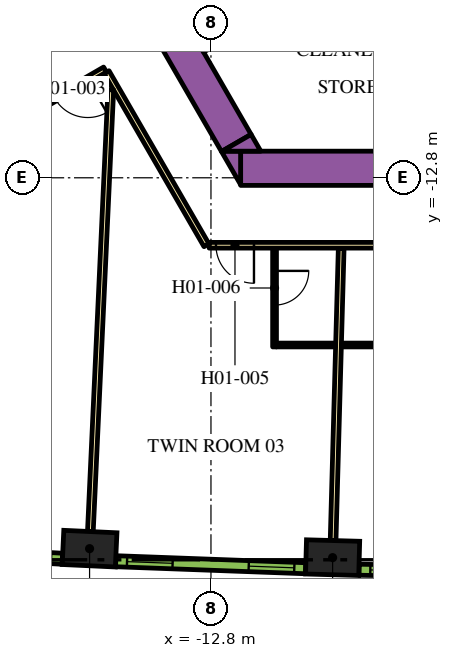
"""IFC4 building model, lengths in metres.
Left out: names, types, materials, properties, quantities, classifications, styles, units other than length and angle.
Written with IfcOpenShell. Run it as: python <this file> out.ifc"""

import sys

from ifc_helpers import new_model, si_unit, direction, frame, frame_2d, origin, origin_2d, place, context, subcontext, project, spatial, polyline, rectangle, outline, extrude, element, fill, save


model = new_model("IFC4")
c1 = context("Model", 3, precision=1e-05, world=origin(), true_north=direction((0.0, 1.0)))
c2 = subcontext(c1, "Body", "Model", "MODEL_VIEW")
j1 = project(units=[si_unit("LENGTHUNIT", "METRE"), si_unit("PLANEANGLEUNIT", "RADIAN")], contexts=[c1])
p1 = place(None, origin())
s1 = spatial("IfcSite", under=j1, at=p1, CompositionType="ELEMENT")
p2 = place(p1, origin())
s2 = spatial("IfcBuilding", under=s1, at=p2, CompositionType="ELEMENT")
p3 = place(p2, frame((0.0, 0.0, 27.6)))
s3 = spatial("IfcBuildingStorey", under=s2, at=p3, CompositionType="ELEMENT", Elevation=27.6)
for number, where, z_axis, x_axis in (
    (1, (-15.994, -22.558, 0.0), (0.0, 0.0, 1.0), (0.999, -0.046, 0.0)),
    (2, (-9.599, -22.795, 0.0), (0.0, 0.0, 1.0), (1.0, -0.028, 0.0)),
):
    element("IfcColumn", number, at=place(p3, frame(where, z_axis=z_axis, x_axis=x_axis)), inside=s3, PredefinedType="COLUMN", context=c2, shape_type="SweptSolid", body=[
        extrude(rectangle(XDim=1.4, YDim=0.9, at=origin_2d()), origin(), (0.0, 0.0, 1.0), 3.9),
    ])
p4 = place(p3, frame((-12.019, -12.55, 0.0), z_axis=(0.0, 0.0, 1.0), x_axis=(1.0, 0.0, 0.0)))
e3 = element("IfcWall", 3, at=p4, inside=s3, PredefinedType="SOLIDWALL", context=c2, shape_type="SweptSolid", body=[
    extrude(rectangle(XDim=21.63, YDim=0.9, at=frame_2d((10.815, 0.0))), origin(), (0.0, 0.0, 1.0), 3.9),
])
p5 = place(p3, origin())
e4 = element("IfcWall", 4, at=p5, inside=s3, PredefinedType="SOLIDWALL", context=c2, shape_type="SweptSolid", body=[
    extrude(outline(polyline([(-12.529, -12.1), (-12.021, -12.1), (-12.021, -12.98), (-12.529, -12.1)])), origin(), (0.0, 0.0, 1.0), 3.9),
])
p6 = place(p3, frame((-12.134, -11.883, 0.0), z_axis=(0.0, 0.0, 1.0), x_axis=(-0.500005339912, 0.866022320763, 0.0)))
e5 = element("IfcWall", 5, at=p6, inside=s3, PredefinedType="SOLIDWALL", context=c2, shape_type="SweptSolid", body=[
    extrude(rectangle(XDim=9.488, YDim=0.9, at=frame_2d((4.744, 0.0))), origin(), (0.0, 0.0, 1.0), 3.9),
])
e6 = element("IfcWall", 6, at=p5, inside=s3, PredefinedType="SOLIDWALL", context=c2, shape_type="SweptSolid", body=[
    extrude(outline(polyline([(-11.489, -12.1), (-12.505, -12.1), (-11.743, -11.66), (-11.489, -12.1)])), origin(), (0.0, 0.0, 1.0), 3.9),
])
p7 = place(p3, frame((-30.463, -16.635, 0.0), z_axis=(0.0, 0.0, 1.0), x_axis=(0.866022394896, 0.500005211512, 0.0)))
e7 = element("IfcWall", 7, at=p7, inside=s3, PredefinedType="PARTITIONING", context=c2, shape_type="SweptSolid", body=[
    extrude(rectangle(XDim=16.144, YDim=0.15, at=frame_2d((8.072, 0.0))), origin(), (0.0, 0.0, 1.0), 2.75),
])
p8 = place(p7, frame((11.004, 0.0, 0.0)))
e8 = element("IfcOpeningElement", 8, at=p8, cuts=e7, PredefinedType="OPENING", context=c2, shape_type="SweptSolid", body=[
    extrude(rectangle(XDim=1.0, YDim=2.1, at=frame_2d((0.5, 1.05))), frame((0.0, 0.085, 0.0), z_axis=(0.0, -1.0, 0.0), x_axis=(1.0, 0.0, 0.0)), (0.0, 0.0, 1.0), 0.17),
])
p9 = place(p7, frame((7.274, 0.0, 0.0)))
e9 = element("IfcOpeningElement", 9, at=p9, cuts=e7, PredefinedType="OPENING", context=c2, shape_type="SweptSolid", body=[
    extrude(rectangle(XDim=1.0, YDim=2.1, at=frame_2d((0.5, 1.05))), frame((0.0, 0.085, 0.0), z_axis=(0.0, -1.0, 0.0), x_axis=(1.0, 0.0, 0.0)), (0.0, 0.0, 1.0), 0.17),
])
p10 = place(p3, frame((-15.587, -9.952, 0.0), z_axis=(0.0, 0.0, 1.0), x_axis=(-0.866022197818, -0.500005552856, 0.0)))
e10 = element("IfcWall", 10, at=p10, inside=s3, PredefinedType="PARTITIONING", context=c2, shape_type="SweptSolid", body=[
    extrude(rectangle(XDim=16.224, YDim=0.15, at=frame_2d((8.112, 0.0))), origin(), (0.0, 0.0, 1.0), 2.75),
])
p11 = place(p10, frame((7.949, 0.0, 0.0)))
e11 = element("IfcOpeningElement", 11, at=p11, cuts=e10, PredefinedType="OPENING", context=c2, shape_type="SweptSolid", body=[
    extrude(rectangle(XDim=1.0, YDim=2.1, at=frame_2d((0.5, 1.05))), frame((0.0, 0.085, 0.0), z_axis=(0.0, -1.0, 0.0), x_axis=(1.0, 0.0, 0.0)), (0.0, 0.0, 1.0), 0.17),
])
p12 = place(p10, frame((0.525, 0.0, 0.0)))
e12 = element("IfcOpeningElement", 12, at=p12, cuts=e10, PredefinedType="OPENING", context=c2, shape_type="SweptSolid", body=[
    extrude(rectangle(XDim=1.0, YDim=2.1, at=frame_2d((0.5, 1.05))), frame((0.0, 0.085, 0.0), z_axis=(0.0, -1.0, 0.0), x_axis=(1.0, 0.0, 0.0)), (0.0, 0.0, 1.0), 0.17),
])
p13 = place(p3, frame((-12.918, -14.575, 0.0), z_axis=(0.0, 0.0, 1.0), x_axis=(-0.500009150678, 0.866020120573, 0.0)))
e13 = element("IfcWall", 13, at=p13, inside=s3, PredefinedType="PARTITIONING", context=c2, shape_type="SweptSolid", body=[
    extrude(rectangle(XDim=5.258, YDim=0.15, at=frame_2d((2.629, 0.0))), origin(), (0.0, 0.0, 1.0), 2.75),
])
p14 = place(p3, frame((12.918, -14.575, 0.0), z_axis=(0.0, 0.0, 1.0), x_axis=(-1.0, 0.0, 0.0)))
e14 = element("IfcWall", 14, at=p14, inside=s3, PredefinedType="PARTITIONING", context=c2, shape_type="SweptSolid", body=[
    extrude(rectangle(XDim=25.766, YDim=0.15, at=frame_2d((12.883, 0.0))), origin(), (0.0, 0.0, 1.0), 2.75),
])
p15 = place(p14, frame((24.586, 0.0, 0.0)))
e15 = element("IfcOpeningElement", 15, at=p15, cuts=e14, PredefinedType="OPENING", context=c2, shape_type="SweptSolid", body=[
    extrude(rectangle(XDim=1.0, YDim=2.1, at=frame_2d((0.5, 1.05))), frame((0.0, 0.085, 0.0), z_axis=(0.0, -1.0, 0.0), x_axis=(1.0, 0.0, 0.0)), (0.0, 0.0, 1.0), 0.17),
])
p16 = place(p14, frame((16.195, 0.0, 0.0)))
e16 = element("IfcOpeningElement", 16, at=p16, cuts=e14, PredefinedType="OPENING", context=c2, shape_type="SweptSolid", body=[
    extrude(rectangle(XDim=1.0, YDim=2.1, at=frame_2d((0.5, 1.05))), frame((0.0, 0.085, 0.0), z_axis=(0.0, -1.0, 0.0), x_axis=(1.0, 0.0, 0.0)), (0.0, 0.0, 1.0), 0.17),
])
p17 = place(p14, frame((14.066, 0.0, 0.0)))
e17 = element("IfcOpeningElement", 17, at=p17, cuts=e14, PredefinedType="OPENING", context=c2, shape_type="SweptSolid", body=[
    extrude(rectangle(XDim=0.9, YDim=2.1, at=frame_2d((0.45, 1.05))), frame((0.0, 0.085, 0.0), z_axis=(0.0, -1.0, 0.0), x_axis=(1.0, 0.0, 0.0)), (0.0, 0.0, 1.0), 0.17),
])
p18 = place(p14, frame((6.824, 0.0, 0.0)))
e18 = element("IfcOpeningElement", 18, at=p18, cuts=e14, PredefinedType="OPENING", context=c2, shape_type="SweptSolid", body=[
    extrude(rectangle(XDim=1.0, YDim=2.1, at=frame_2d((0.5, 1.05))), frame((0.0, 0.085, 0.0), z_axis=(0.0, -1.0, 0.0), x_axis=(1.0, 0.0, 0.0)), (0.0, 0.0, 1.0), 0.17),
])
p19 = place(p14, frame((5.517, 0.0, 0.0)))
e19 = element("IfcOpeningElement", 19, at=p19, cuts=e14, PredefinedType="OPENING", context=c2, shape_type="SweptSolid", body=[
    extrude(rectangle(XDim=1.0, YDim=2.1, at=frame_2d((0.5, 1.05))), frame((0.0, 0.085, 0.0), z_axis=(0.0, -1.0, 0.0), x_axis=(1.0, 0.0, 0.0)), (0.0, 0.0, 1.0), 0.17),
])
p20 = place(p3, frame((-15.973, -22.109, 0.0), z_axis=(0.0, 0.0, 1.0), x_axis=(0.046191717129, 0.998932592955, 0.0)))
e20 = element("IfcWall", 20, at=p20, inside=s3, PredefinedType="PARTITIONING", context=c2, shape_type="SweptSolid", body=[
    extrude(rectangle(XDim=11.638, YDim=0.15, at=frame_2d((5.819, 0.0))), origin(), (0.0, 0.0, 1.0), 2.75),
])
p21 = place(p3, frame((-9.586, -22.345, 0.0), z_axis=(0.0, 0.0, 1.0), x_axis=(0.027722115646, 0.999615668297, 0.0)))
e21 = element("IfcWall", 21, at=p21, inside=s3, PredefinedType="PARTITIONING", context=c2, shape_type="SweptSolid", body=[
    extrude(rectangle(XDim=7.688, YDim=0.15, at=frame_2d((3.844, 0.0))), origin(), (0.0, 0.0, 1.0), 2.75),
])
p22 = place(p3, frame((-11.127, -14.65, 0.0), z_axis=(0.0, 0.0, 1.0), x_axis=(0.0, -1.0, 0.0)))
e22 = element("IfcWall", 22, at=p22, inside=s3, PredefinedType="PARTITIONING", context=c2, shape_type="SweptSolid", body=[
    extrude(rectangle(XDim=2.6, YDim=0.1, at=frame_2d((1.3, 0.0))), origin(), (0.0, 0.0, 1.0), 2.75),
])
p23 = place(p22, frame((0.6, 0.0, 0.0)))
e23 = element("IfcOpeningElement", 23, at=p23, cuts=e22, PredefinedType="OPENING", context=c2, shape_type="SweptSolid", body=[
    extrude(rectangle(XDim=0.9, YDim=2.1, at=frame_2d((0.45, 1.05))), frame((0.0, 0.06, 0.0), z_axis=(0.0, -1.0, 0.0), x_axis=(1.0, 0.0, 0.0)), (0.0, 0.0, 1.0), 0.12),
])
p24 = place(p3, frame((-11.077, -17.2, 0.0), z_axis=(0.0, 0.0, 1.0), x_axis=(1.0, 0.0, 0.0)))
e24 = element("IfcWall", 24, at=p24, inside=s3, PredefinedType="PARTITIONING", context=c2, shape_type="SweptSolid", body=[
    extrude(rectangle(XDim=1.55, YDim=0.1, at=frame_2d((0.775, 0.0))), origin(), (0.0, 0.0, 1.0), 2.75),
])
p25 = place(p3, frame((-7.669, -17.2, 0.0), z_axis=(0.0, 0.0, 1.0), x_axis=(-1.0, 0.0, 0.0)))
e25 = element("IfcWall", 25, at=p25, inside=s3, PredefinedType="PARTITIONING", context=c2, shape_type="SweptSolid", body=[
    extrude(rectangle(XDim=1.69, YDim=0.1, at=frame_2d((0.845, 0.0))), origin(), (0.0, 0.0, 1.0), 2.75),
])
p26 = place(p3, frame((-21.701, -22.547, 0.0), z_axis=(0.0, 0.0, 1.0), x_axis=(0.998464708705, -0.055391564976, 0.0)))
e26 = element("IfcWall", 26, at=p26, inside=s3, PredefinedType="SOLIDWALL", context=c2, shape_type="SweptSolid", body=[
    extrude(rectangle(XDim=4.998, YDim=0.29, at=frame_2d((2.499, 0.0))), origin(), (0.0, 0.0, 1.0), 3.65),
])
p27 = place(p26, frame((0.297, 0.0, 0.9)))
e27 = element("IfcOpeningElement", 27, at=p27, cuts=e26, PredefinedType="OPENING", context=c2, shape_type="SweptSolid", body=[
    extrude(rectangle(XDim=1.2, YDim=2.15, at=frame_2d((0.6, 1.075))), frame((0.0, 0.155, 0.0), z_axis=(0.0, -1.0, 0.0), x_axis=(1.0, 0.0, 0.0)), (0.0, 0.0, 1.0), 0.31),
])
p28 = place(p26, frame((3.501, 0.0, 0.9)))
e28 = element("IfcOpeningElement", 28, at=p28, cuts=e26, PredefinedType="OPENING", context=c2, shape_type="SweptSolid", body=[
    extrude(rectangle(XDim=1.2, YDim=2.15, at=frame_2d((0.6, 1.075))), frame((0.0, 0.155, 0.0), z_axis=(0.0, -1.0, 0.0), x_axis=(1.0, 0.0, 0.0)), (0.0, 0.0, 1.0), 0.31),
])
p29 = place(p3, frame((-15.305, -22.889, 0.0), z_axis=(0.0, 0.0, 1.0), x_axis=(0.999317974969, -0.036926750529, 0.0)))
e29 = element("IfcWall", 29, at=p29, inside=s3, PredefinedType="SOLIDWALL", context=c2, shape_type="SweptSolid", body=[
    extrude(rectangle(XDim=4.998, YDim=0.29, at=frame_2d((2.499, 0.0))), origin(), (0.0, 0.0, 1.0), 3.65),
])
p30 = place(p29, frame((0.297, 0.0, 0.9)))
e30 = element("IfcOpeningElement", 30, at=p30, cuts=e29, PredefinedType="OPENING", context=c2, shape_type="SweptSolid", body=[
    extrude(rectangle(XDim=1.2, YDim=2.15, at=frame_2d((0.6, 1.075))), frame((0.0, 0.155, 0.0), z_axis=(0.0, -1.0, 0.0), x_axis=(1.0, 0.0, 0.0)), (0.0, 0.0, 1.0), 0.31),
])
p31 = place(p29, frame((3.501, 0.0, 0.9)))
e31 = element("IfcOpeningElement", 31, at=p31, cuts=e29, PredefinedType="OPENING", context=c2, shape_type="SweptSolid", body=[
    extrude(rectangle(XDim=1.2, YDim=2.15, at=frame_2d((0.6, 1.075))), frame((0.0, 0.155, 0.0), z_axis=(0.0, -1.0, 0.0), x_axis=(1.0, 0.0, 0.0)), (0.0, 0.0, 1.0), 0.31),
])
p32 = place(p3, frame((-8.904, -23.113, 0.0), z_axis=(0.0, 0.0, 1.0), x_axis=(0.999829529479, -0.018463801951, 0.0)))
e32 = element("IfcWall", 32, at=p32, inside=s3, PredefinedType="SOLIDWALL", context=c2, shape_type="SweptSolid", body=[
    extrude(rectangle(XDim=4.998, YDim=0.29, at=frame_2d((2.499, 0.0))), origin(), (0.0, 0.0, 1.0), 3.65),
])
p33 = place(p32, frame((0.297, 0.0, 0.9)))
e33 = element("IfcOpeningElement", 33, at=p33, cuts=e32, PredefinedType="OPENING", context=c2, shape_type="SweptSolid", body=[
    extrude(rectangle(XDim=1.2, YDim=2.15, at=frame_2d((0.6, 1.075))), frame((0.0, 0.155, 0.0), z_axis=(0.0, -1.0, 0.0), x_axis=(1.0, 0.0, 0.0)), (0.0, 0.0, 1.0), 0.31),
])
p34 = place(p32, frame((3.501, 0.0, 0.9)))
e34 = element("IfcOpeningElement", 34, at=p34, cuts=e32, PredefinedType="OPENING", context=c2, shape_type="SweptSolid", body=[
    extrude(rectangle(XDim=1.2, YDim=2.15, at=frame_2d((0.6, 1.075))), frame((0.0, 0.155, 0.0), z_axis=(0.0, -1.0, 0.0), x_axis=(1.0, 0.0, 0.0)), (0.0, 0.0, 1.0), 0.31),
])
p35 = place(p12, origin())
e35 = element("IfcDoor", 35, at=p35, inside=s3, OperationType="SINGLE_SWING_LEFT", PredefinedType="DOOR", context=c2, shape_type="SweptSolid", body=[
    extrude(rectangle(XDim=1.0, YDim=2.1, at=frame_2d((0.5, 1.05))), frame((0.0, 0.025, 0.0), z_axis=(0.0, -1.0, 0.0), x_axis=(1.0, 0.0, 0.0)), (0.0, 0.0, 1.0), 0.05),
])
fill(e12, e35)
p36 = place(p15, origin())
e36 = element("IfcDoor", 36, at=p36, inside=s3, OperationType="SINGLE_SWING_RIGHT", PredefinedType="DOOR", context=c2, shape_type="SweptSolid", body=[
    extrude(rectangle(XDim=1.0, YDim=2.1, at=frame_2d((0.5, 1.05))), frame((0.0, 0.025, 0.0), z_axis=(0.0, -1.0, 0.0), x_axis=(1.0, 0.0, 0.0)), (0.0, 0.0, 1.0), 0.05),
])
fill(e15, e36)
p37 = place(p23, origin())
e37 = element("IfcDoor", 37, at=p37, inside=s3, OperationType="SINGLE_SWING_RIGHT", PredefinedType="DOOR", context=c2, shape_type="SweptSolid", body=[
    extrude(rectangle(XDim=0.9, YDim=2.1, at=frame_2d((0.45, 1.05))), frame((0.0, 0.025, 0.0), z_axis=(0.0, -1.0, 0.0), x_axis=(1.0, 0.0, 0.0)), (0.0, 0.0, 1.0), 0.05),
])
fill(e23, e37)
p38 = place(p30, origin())
e38 = element("IfcWindow", 38, at=p38, inside=s3, PartitioningType="DOUBLE_PANEL_VERTICAL", PredefinedType="WINDOW", context=c2, shape_type="SweptSolid", body=[
    extrude(rectangle(XDim=1.2, YDim=2.15, at=frame_2d((0.6, 1.075))), frame((0.0, 0.015, 0.0), z_axis=(0.0, -1.0, 0.0), x_axis=(1.0, 0.0, 0.0)), (0.0, 0.0, 1.0), 0.06),
])
fill(e30, e38)
p39 = place(p31, origin())
e39 = element("IfcWindow", 39, at=p39, inside=s3, PartitioningType="DOUBLE_PANEL_VERTICAL", PredefinedType="WINDOW", context=c2, shape_type="SweptSolid", body=[
    extrude(rectangle(XDim=1.2, YDim=2.15, at=frame_2d((0.6, 1.075))), frame((0.0, 0.015, 0.0), z_axis=(0.0, -1.0, 0.0), x_axis=(1.0, 0.0, 0.0)), (0.0, 0.0, 1.0), 0.06),
])
fill(e31, e39)
p40 = place(p33, origin())
e40 = element("IfcWindow", 40, at=p40, inside=s3, PartitioningType="DOUBLE_PANEL_VERTICAL", PredefinedType="WINDOW", context=c2, shape_type="SweptSolid", body=[
    extrude(rectangle(XDim=1.2, YDim=2.15, at=frame_2d((0.6, 1.075))), frame((0.0, 0.015, 0.0), z_axis=(0.0, -1.0, 0.0), x_axis=(1.0, 0.0, 0.0)), (0.0, 0.0, 1.0), 0.06),
])
fill(e33, e40)
save(model, sys.argv[1])
